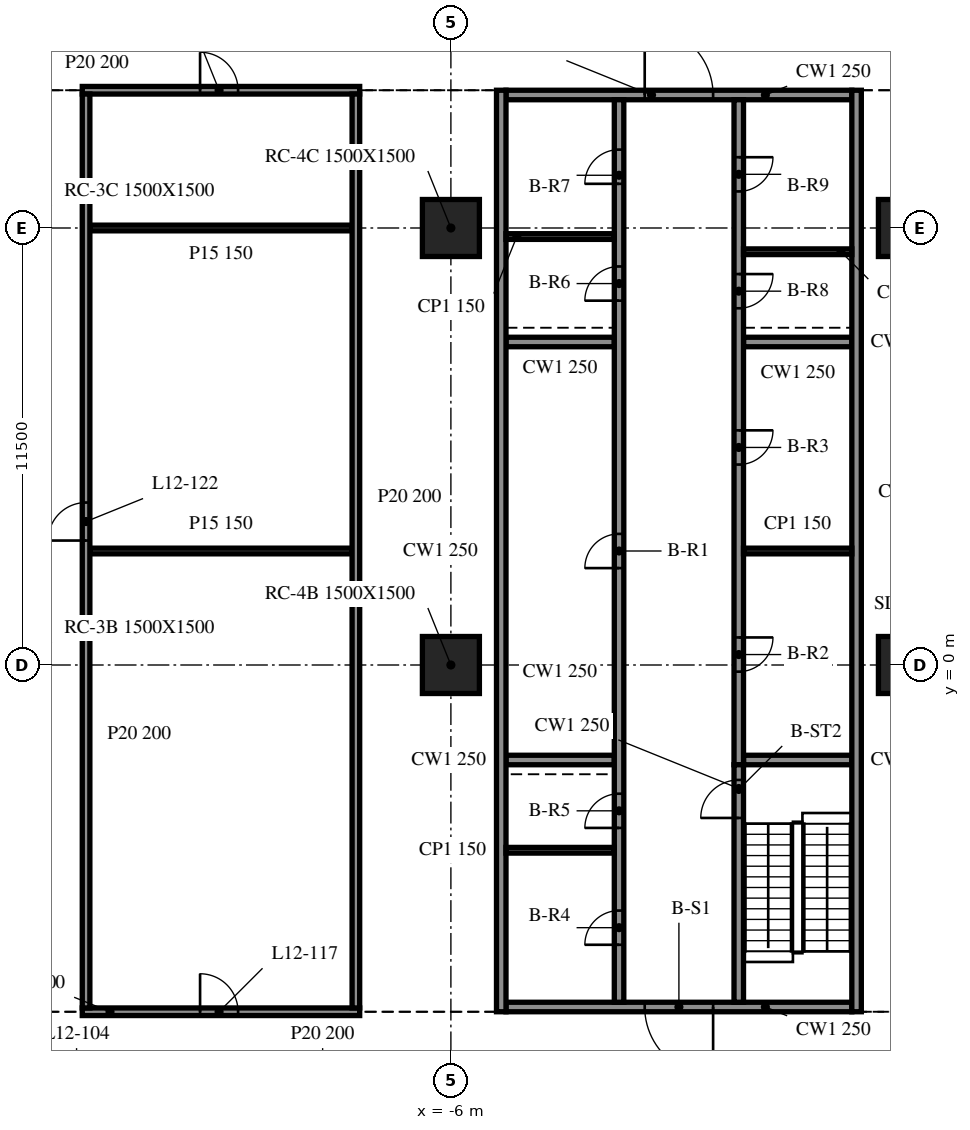
"""IFC4 building model, lengths in metres.
Left out: names, types, materials, properties, quantities, classifications, styles, units other than length and angle.
Written with IfcOpenShell. Run it as: python <this file> out.ifc"""

import sys

from ifc_helpers import new_model, si_unit, direction, frame, frame_2d, origin, origin_2d, place, context, subcontext, project, spatial, rectangle, extrude, element, fill, save


model = new_model("IFC4")
c1 = context("Model", 3, precision=1e-05, world=origin(), true_north=direction((0.0, 1.0)))
c2 = subcontext(c1, "Body", "Model", "MODEL_VIEW")
j1 = project(units=[si_unit("LENGTHUNIT", "METRE"), si_unit("PLANEANGLEUNIT", "RADIAN")], contexts=[c1])
p1 = place(None, origin())
s1 = spatial("IfcSite", under=j1, at=p1, CompositionType="ELEMENT")
p2 = place(p1, origin())
s2 = spatial("IfcBuilding", under=s1, at=p2, CompositionType="ELEMENT")
p3 = place(p2, frame((0.0, 0.0, 54.6)))
s3 = spatial("IfcBuildingStorey", under=s2, at=p3, CompositionType="ELEMENT", Elevation=54.6)
for number, where, z_axis, x_axis in (
    (1, (-6.0, 0.0, -0.34), (0.0, 0.0, 1.0), (1.0, 0.0, 0.0)),
    (2, (-6.0, 11.5, -0.34), (0.0, 0.0, 1.0), (1.0, 0.0, 0.0)),
    (3, (6.0, 0.0, -0.34), (0.0, 0.0, 1.0), (1.0, 0.0, 0.0)),
    (4, (6.0, 11.5, -0.34), (0.0, 0.0, 1.0), (1.0, 0.0, 0.0)),
):
    element("IfcColumn", number, at=place(p3, frame(where, z_axis=z_axis, x_axis=x_axis)), inside=s3, PredefinedType="COLUMN", context=c2, shape_type="SweptSolid", body=[
        extrude(rectangle(XDim=1.5, YDim=1.5, at=origin_2d()), origin(), (0.0, 0.0, 1.0), 4.3),
    ])
for number, where, z_axis, x_axis in (
    (5, (-4.675, 15.125, 0.0), (0.0, 0.0, 1.0), (0.0, -1.0, 0.0)),
    (6, (4.675, -9.125, 0.0), (0.0, 0.0, 1.0), (0.0, 1.0, 0.0)),
):
    element("IfcWall", number, at=place(p3, frame(where, z_axis=z_axis, x_axis=x_axis)), inside=s3, PredefinedType="SOLIDWALL", context=c2, shape_type="SweptSolid", body=[
        extrude(rectangle(XDim=24.25, YDim=0.25, at=frame_2d((12.125, 0.0))), origin(), (0.0, 0.0, 1.0), 3.96),
    ])
p4 = place(p3, frame((4.55, -9.0, 0.0), z_axis=(0.0, 0.0, 1.0), x_axis=(-1.0, 0.0, 0.0)))
e7 = element("IfcWall", 7, at=p4, inside=s3, PredefinedType="SOLIDWALL", context=c2, shape_type="SweptSolid", body=[
    extrude(rectangle(XDim=9.1, YDim=0.25, at=frame_2d((4.55, 0.0))), origin(), (0.0, 0.0, 1.0), 3.96),
])
p5 = place(p4, frame((3.65, 0.0, 0.0)))
e8 = element("IfcOpeningElement", 8, at=p5, cuts=e7, PredefinedType="OPENING", context=c2, shape_type="SweptSolid", body=[
    extrude(rectangle(XDim=1.8, YDim=2.1, at=frame_2d((0.9, 1.05))), frame((0.0, 0.135, 0.0), z_axis=(0.0, -1.0, 0.0), x_axis=(1.0, 0.0, 0.0)), (0.0, 0.0, 1.0), 0.27),
])
p6 = place(p3, frame((-4.55, 15.0, 0.0), z_axis=(0.0, 0.0, 1.0), x_axis=(1.0, 0.0, 0.0)))
e9 = element("IfcWall", 9, at=p6, inside=s3, PredefinedType="SOLIDWALL", context=c2, shape_type="SweptSolid", body=[
    extrude(rectangle(XDim=9.1, YDim=0.25, at=frame_2d((4.55, 0.0))), origin(), (0.0, 0.0, 1.0), 3.96),
])
p7 = place(p6, frame((3.65, 0.0, 0.0)))
e10 = element("IfcOpeningElement", 10, at=p7, cuts=e9, PredefinedType="OPENING", context=c2, shape_type="SweptSolid", body=[
    extrude(rectangle(XDim=1.8, YDim=2.1, at=frame_2d((0.9, 1.05))), frame((0.0, 0.135, 0.0), z_axis=(0.0, -1.0, 0.0), x_axis=(1.0, 0.0, 0.0)), (0.0, 0.0, 1.0), 0.27),
])
p8 = place(p3, frame((-1.575, -8.875, 0.0), z_axis=(0.0, 0.0, 1.0), x_axis=(0.0, 1.0, 0.0)))
e11 = element("IfcWall", 11, at=p8, inside=s3, PredefinedType="SOLIDWALL", context=c2, shape_type="SweptSolid", body=[
    extrude(rectangle(XDim=23.75, YDim=0.25, at=frame_2d((11.875, 0.0))), origin(), (0.0, 0.0, 1.0), 3.96),
])
p9 = place(p8, frame((11.425, 0.0, 0.0)))
e12 = element("IfcOpeningElement", 12, at=p9, cuts=e11, PredefinedType="OPENING", context=c2, shape_type="SweptSolid", body=[
    extrude(rectangle(XDim=0.9, YDim=2.1, at=frame_2d((0.45, 1.05))), frame((0.0, 0.135, 0.0), z_axis=(0.0, -1.0, 0.0), x_axis=(1.0, 0.0, 0.0)), (0.0, 0.0, 1.0), 0.27),
])
p10 = place(p8, frame((1.512, 0.0, 0.0)))
e13 = element("IfcOpeningElement", 13, at=p10, cuts=e11, PredefinedType="OPENING", context=c2, shape_type="SweptSolid", body=[
    extrude(rectangle(XDim=0.9, YDim=2.1, at=frame_2d((0.45, 1.05))), frame((0.0, 0.135, 0.0), z_axis=(0.0, -1.0, 0.0), x_axis=(1.0, 0.0, 0.0)), (0.0, 0.0, 1.0), 0.27),
])
p11 = place(p8, frame((4.587, 0.0, 0.0)))
e14 = element("IfcOpeningElement", 14, at=p11, cuts=e11, PredefinedType="OPENING", context=c2, shape_type="SweptSolid", body=[
    extrude(rectangle(XDim=0.9, YDim=2.1, at=frame_2d((0.45, 1.05))), frame((0.0, 0.135, 0.0), z_axis=(0.0, -1.0, 0.0), x_axis=(1.0, 0.0, 0.0)), (0.0, 0.0, 1.0), 0.27),
])
p12 = place(p8, frame((18.462, 0.0, 0.0)))
e15 = element("IfcOpeningElement", 15, at=p12, cuts=e11, PredefinedType="OPENING", context=c2, shape_type="SweptSolid", body=[
    extrude(rectangle(XDim=0.9, YDim=2.1, at=frame_2d((0.45, 1.05))), frame((0.0, 0.135, 0.0), z_axis=(0.0, -1.0, 0.0), x_axis=(1.0, 0.0, 0.0)), (0.0, 0.0, 1.0), 0.27),
])
p13 = place(p8, frame((21.538, 0.0, 0.0)))
e16 = element("IfcOpeningElement", 16, at=p13, cuts=e11, PredefinedType="OPENING", context=c2, shape_type="SweptSolid", body=[
    extrude(rectangle(XDim=0.9, YDim=2.1, at=frame_2d((0.45, 1.05))), frame((0.0, 0.135, 0.0), z_axis=(0.0, -1.0, 0.0), x_axis=(1.0, 0.0, 0.0)), (0.0, 0.0, 1.0), 0.27),
])
p14 = place(p3, frame((1.575, -8.875, 0.0), z_axis=(0.0, 0.0, 1.0), x_axis=(0.0, 1.0, 0.0)))
e17 = element("IfcWall", 17, at=p14, inside=s3, PredefinedType="SOLIDWALL", context=c2, shape_type="SweptSolid", body=[
    extrude(rectangle(XDim=6.25, YDim=0.25, at=frame_2d((3.125, 0.0))), origin(), (0.0, 0.0, 1.0), 3.96),
])
p15 = place(p14, frame((4.85, 0.0, 0.0)))
e18 = element("IfcOpeningElement", 18, at=p15, cuts=e17, PredefinedType="OPENING", context=c2, shape_type="SweptSolid", body=[
    extrude(rectangle(XDim=1.0, YDim=2.1, at=frame_2d((0.5, 1.05))), frame((0.0, 0.135, 0.0), z_axis=(0.0, -1.0, 0.0), x_axis=(1.0, 0.0, 0.0)), (0.0, 0.0, 1.0), 0.27),
])
p16 = place(p3, frame((1.575, 14.875, 0.0), z_axis=(0.0, 0.0, 1.0), x_axis=(0.0, -1.0, 0.0)))
e19 = element("IfcWall", 19, at=p16, inside=s3, PredefinedType="SOLIDWALL", context=c2, shape_type="SweptSolid", body=[
    extrude(rectangle(XDim=17.5, YDim=0.25, at=frame_2d((8.75, 0.0))), origin(), (0.0, 0.0, 1.0), 3.96),
])
p17 = place(p16, frame((14.15, 0.0, 0.0)))
e20 = element("IfcOpeningElement", 20, at=p17, cuts=e19, PredefinedType="OPENING", context=c2, shape_type="SweptSolid", body=[
    extrude(rectangle(XDim=0.9, YDim=2.1, at=frame_2d((0.45, 1.05))), frame((0.0, 0.135, 0.0), z_axis=(0.0, -1.0, 0.0), x_axis=(1.0, 0.0, 0.0)), (0.0, 0.0, 1.0), 0.27),
])
p18 = place(p16, frame((8.7, 0.0, 0.0)))
e21 = element("IfcOpeningElement", 21, at=p18, cuts=e19, PredefinedType="OPENING", context=c2, shape_type="SweptSolid", body=[
    extrude(rectangle(XDim=0.9, YDim=2.1, at=frame_2d((0.45, 1.05))), frame((0.0, 0.135, 0.0), z_axis=(0.0, -1.0, 0.0), x_axis=(1.0, 0.0, 0.0)), (0.0, 0.0, 1.0), 0.27),
])
p19 = place(p16, frame((4.587, 0.0, 0.0)))
e22 = element("IfcOpeningElement", 22, at=p19, cuts=e19, PredefinedType="OPENING", context=c2, shape_type="SweptSolid", body=[
    extrude(rectangle(XDim=0.9, YDim=2.1, at=frame_2d((0.45, 1.05))), frame((0.0, 0.135, 0.0), z_axis=(0.0, -1.0, 0.0), x_axis=(1.0, 0.0, 0.0)), (0.0, 0.0, 1.0), 0.27),
])
p20 = place(p16, frame((1.512, 0.0, 0.0)))
e23 = element("IfcOpeningElement", 23, at=p20, cuts=e19, PredefinedType="OPENING", context=c2, shape_type="SweptSolid", body=[
    extrude(rectangle(XDim=0.9, YDim=2.1, at=frame_2d((0.45, 1.05))), frame((0.0, 0.135, 0.0), z_axis=(0.0, -1.0, 0.0), x_axis=(1.0, 0.0, 0.0)), (0.0, 0.0, 1.0), 0.27),
])
for number, where, z_axis, x_axis in (
    (24, (-4.55, -2.5, 0.0), (0.0, 0.0, 1.0), (1.0, 0.0, 0.0)),
    (25, (-4.55, 8.5, 0.0), (0.0, 0.0, 1.0), (1.0, 0.0, 0.0)),
    (26, (1.7, -2.5, 0.0), (0.0, 0.0, 1.0), (1.0, 0.0, 0.0)),
    (27, (1.7, 8.5, 0.0), (0.0, 0.0, 1.0), (1.0, 0.0, 0.0)),
):
    element("IfcWall", number, at=place(p3, frame(where, z_axis=z_axis, x_axis=x_axis)), inside=s3, PredefinedType="SOLIDWALL", context=c2, shape_type="SweptSolid", body=[
        extrude(rectangle(XDim=2.85, YDim=0.25, at=frame_2d((1.425, 0.0))), origin(), (0.0, 0.0, 1.0), 3.96),
    ])
for number, where, z_axis, x_axis in (
    (28, (1.7, 3.0, 0.0), (0.0, 0.0, 1.0), (1.0, 0.0, 0.0)),
    (29, (-4.55, -4.875, 0.0), (0.0, 0.0, 1.0), (1.0, 0.0, 0.0)),
    (30, (-4.55, 11.275, 0.0), (0.0, 0.0, 1.0), (1.0, 0.0, 0.0)),
    (31, (1.7, 10.875, 0.0), (0.0, 0.0, 1.0), (1.0, 0.0, 0.0)),
):
    element("IfcWall", number, at=place(p3, frame(where, z_axis=z_axis, x_axis=x_axis)), inside=s3, PredefinedType="PARTITIONING", context=c2, shape_type="SweptSolid", body=[
        extrude(rectangle(XDim=2.85, YDim=0.15, at=frame_2d((1.425, 0.0))), origin(), (0.0, 0.0, 1.0), 3.96),
    ])
p21 = place(p3, frame((-15.7, -9.125, 0.0), z_axis=(0.0, 0.0, 1.0), x_axis=(1.0, 0.0, 0.0)))
e32 = element("IfcWall", 32, at=p21, inside=s3, PredefinedType="PARTITIONING", context=c2, shape_type="SweptSolid", body=[
    extrude(rectangle(XDim=7.3, YDim=0.2, at=frame_2d((3.65, 0.0))), origin(), (0.0, 0.0, 1.0), 3.96),
])
p22 = place(p21, frame((3.1, 0.0, 0.0)))
e33 = element("IfcOpeningElement", 33, at=p22, cuts=e32, PredefinedType="OPENING", context=c2, shape_type="SweptSolid", body=[
    extrude(rectangle(XDim=1.0, YDim=2.1, at=frame_2d((0.5, 1.05))), frame((0.0, 0.11, 0.0), z_axis=(0.0, -1.0, 0.0), x_axis=(1.0, 0.0, 0.0)), (0.0, 0.0, 1.0), 0.22),
])
for number, where, z_axis, x_axis in (
    (34, (-15.5, 3.0, 0.0), (0.0, 0.0, 1.0), (1.0, 0.0, 0.0)),
    (35, (-15.5, 11.5, 0.0), (0.0, 0.0, 1.0), (1.0, 0.0, 0.0)),
):
    element("IfcWall", number, at=place(p3, frame(where, z_axis=z_axis, x_axis=x_axis)), inside=s3, PredefinedType="PARTITIONING", context=c2, shape_type="SweptSolid", body=[
        extrude(rectangle(XDim=6.9, YDim=0.15, at=frame_2d((3.45, 0.0))), origin(), (0.0, 0.0, 1.0), 3.96),
    ])
p23 = place(p3, frame((-15.7, 15.125, 0.0), z_axis=(0.0, 0.0, 1.0), x_axis=(1.0, 0.0, 0.0)))
e36 = element("IfcWall", 36, at=p23, inside=s3, PredefinedType="PARTITIONING", context=c2, shape_type="SweptSolid", body=[
    extrude(rectangle(XDim=7.3, YDim=0.2, at=frame_2d((3.65, 0.0))), origin(), (0.0, 0.0, 1.0), 3.96),
])
p24 = place(p23, frame((3.1, 0.0, 0.0)))
e37 = element("IfcOpeningElement", 37, at=p24, cuts=e36, PredefinedType="OPENING", context=c2, shape_type="SweptSolid", body=[
    extrude(rectangle(XDim=1.0, YDim=2.1, at=frame_2d((0.5, 1.05))), frame((0.0, 0.11, 0.0), z_axis=(0.0, -1.0, 0.0), x_axis=(1.0, 0.0, 0.0)), (0.0, 0.0, 1.0), 0.22),
])
p25 = place(p3, frame((-15.6, -9.025, 0.0), z_axis=(0.0, 0.0, 1.0), x_axis=(0.0, 1.0, 0.0)))
e38 = element("IfcWall", 38, at=p25, inside=s3, PredefinedType="PARTITIONING", context=c2, shape_type="SweptSolid", body=[
    extrude(rectangle(XDim=24.05, YDim=0.2, at=frame_2d((12.025, 0.0))), origin(), (0.0, 0.0, 1.0), 3.96),
])
p26 = place(p25, frame((12.3, 0.0, 0.0)))
e39 = element("IfcOpeningElement", 39, at=p26, cuts=e38, PredefinedType="OPENING", context=c2, shape_type="SweptSolid", body=[
    extrude(rectangle(XDim=1.0, YDim=2.1, at=frame_2d((0.5, 1.05))), frame((0.0, 0.11, 0.0), z_axis=(0.0, -1.0, 0.0), x_axis=(1.0, 0.0, 0.0)), (0.0, 0.0, 1.0), 0.22),
])
p27 = place(p3, frame((-8.5, -9.025, 0.0), z_axis=(0.0, 0.0, 1.0), x_axis=(0.0, 1.0, 0.0)))
e40 = element("IfcWall", 40, at=p27, inside=s3, PredefinedType="PARTITIONING", context=c2, shape_type="SweptSolid", body=[
    extrude(rectangle(XDim=24.05, YDim=0.2, at=frame_2d((12.025, 0.0))), origin(), (0.0, 0.0, 1.0), 3.96),
])
p28 = place(p5, origin())
e41 = element("IfcDoor", 41, at=p28, inside=s3, OperationType="DOUBLE_DOOR_SINGLE_SWING", PredefinedType="DOOR", context=c2, shape_type="SweptSolid", body=[
    extrude(rectangle(XDim=1.8, YDim=2.1, at=frame_2d((0.9, 1.05))), frame((0.0, 0.025, 0.0), z_axis=(0.0, -1.0, 0.0), x_axis=(1.0, 0.0, 0.0)), (0.0, 0.0, 1.0), 0.05),
])
fill(e8, e41)
p29 = place(p7, origin())
e42 = element("IfcDoor", 42, at=p29, inside=s3, OperationType="DOUBLE_DOOR_SINGLE_SWING", PredefinedType="DOOR", context=c2, shape_type="SweptSolid", body=[
    extrude(rectangle(XDim=1.8, YDim=2.1, at=frame_2d((0.9, 1.05))), frame((0.0, 0.025, 0.0), z_axis=(0.0, -1.0, 0.0), x_axis=(1.0, 0.0, 0.0)), (0.0, 0.0, 1.0), 0.05),
])
fill(e10, e42)
p30 = place(p9, origin())
e43 = element("IfcDoor", 43, at=p30, inside=s3, OperationType="SINGLE_SWING_LEFT", PredefinedType="DOOR", context=c2, shape_type="SweptSolid", body=[
    extrude(rectangle(XDim=0.9, YDim=2.1, at=frame_2d((0.45, 1.05))), frame((0.0, 0.025, 0.0), z_axis=(0.0, -1.0, 0.0), x_axis=(1.0, 0.0, 0.0)), (0.0, 0.0, 1.0), 0.05),
])
fill(e12, e43)
p31 = place(p17, origin())
e44 = element("IfcDoor", 44, at=p31, inside=s3, OperationType="SINGLE_SWING_RIGHT", PredefinedType="DOOR", context=c2, shape_type="SweptSolid", body=[
    extrude(rectangle(XDim=0.9, YDim=2.1, at=frame_2d((0.45, 1.05))), frame((0.0, 0.025, 0.0), z_axis=(0.0, -1.0, 0.0), x_axis=(1.0, 0.0, 0.0)), (0.0, 0.0, 1.0), 0.05),
])
fill(e20, e44)
p32 = place(p18, origin())
e45 = element("IfcDoor", 45, at=p32, inside=s3, OperationType="SINGLE_SWING_LEFT", PredefinedType="DOOR", context=c2, shape_type="SweptSolid", body=[
    extrude(rectangle(XDim=0.9, YDim=2.1, at=frame_2d((0.45, 1.05))), frame((0.0, 0.025, 0.0), z_axis=(0.0, -1.0, 0.0), x_axis=(1.0, 0.0, 0.0)), (0.0, 0.0, 1.0), 0.05),
])
fill(e21, e45)
p33 = place(p10, origin())
e46 = element("IfcDoor", 46, at=p33, inside=s3, OperationType="SINGLE_SWING_RIGHT", PredefinedType="DOOR", context=c2, shape_type="SweptSolid", body=[
    extrude(rectangle(XDim=0.9, YDim=2.1, at=frame_2d((0.45, 1.05))), frame((0.0, 0.025, 0.0), z_axis=(0.0, -1.0, 0.0), x_axis=(1.0, 0.0, 0.0)), (0.0, 0.0, 1.0), 0.05),
])
fill(e13, e46)
p34 = place(p11, origin())
e47 = element("IfcDoor", 47, at=p34, inside=s3, OperationType="SINGLE_SWING_LEFT", PredefinedType="DOOR", context=c2, shape_type="SweptSolid", body=[
    extrude(rectangle(XDim=0.9, YDim=2.1, at=frame_2d((0.45, 1.05))), frame((0.0, 0.025, 0.0), z_axis=(0.0, -1.0, 0.0), x_axis=(1.0, 0.0, 0.0)), (0.0, 0.0, 1.0), 0.05),
])
fill(e14, e47)
p35 = place(p12, origin())
e48 = element("IfcDoor", 48, at=p35, inside=s3, OperationType="SINGLE_SWING_RIGHT", PredefinedType="DOOR", context=c2, shape_type="SweptSolid", body=[
    extrude(rectangle(XDim=0.9, YDim=2.1, at=frame_2d((0.45, 1.05))), frame((0.0, 0.025, 0.0), z_axis=(0.0, -1.0, 0.0), x_axis=(1.0, 0.0, 0.0)), (0.0, 0.0, 1.0), 0.05),
])
fill(e15, e48)
p36 = place(p13, origin())
e49 = element("IfcDoor", 49, at=p36, inside=s3, OperationType="SINGLE_SWING_LEFT", PredefinedType="DOOR", context=c2, shape_type="SweptSolid", body=[
    extrude(rectangle(XDim=0.9, YDim=2.1, at=frame_2d((0.45, 1.05))), frame((0.0, 0.025, 0.0), z_axis=(0.0, -1.0, 0.0), x_axis=(1.0, 0.0, 0.0)), (0.0, 0.0, 1.0), 0.05),
])
fill(e16, e49)
p37 = place(p19, origin())
e50 = element("IfcDoor", 50, at=p37, inside=s3, OperationType="SINGLE_SWING_RIGHT", PredefinedType="DOOR", context=c2, shape_type="SweptSolid", body=[
    extrude(rectangle(XDim=0.9, YDim=2.1, at=frame_2d((0.45, 1.05))), frame((0.0, 0.025, 0.0), z_axis=(0.0, -1.0, 0.0), x_axis=(1.0, 0.0, 0.0)), (0.0, 0.0, 1.0), 0.05),
])
fill(e22, e50)
p38 = place(p20, origin())
e51 = element("IfcDoor", 51, at=p38, inside=s3, OperationType="SINGLE_SWING_LEFT", PredefinedType="DOOR", context=c2, shape_type="SweptSolid", body=[
    extrude(rectangle(XDim=0.9, YDim=2.1, at=frame_2d((0.45, 1.05))), frame((0.0, 0.025, 0.0), z_axis=(0.0, -1.0, 0.0), x_axis=(1.0, 0.0, 0.0)), (0.0, 0.0, 1.0), 0.05),
])
fill(e23, e51)
p39 = place(p15, origin())
e52 = element("IfcDoor", 52, at=p39, inside=s3, OperationType="SINGLE_SWING_RIGHT", PredefinedType="DOOR", context=c2, shape_type="SweptSolid", body=[
    extrude(rectangle(XDim=1.0, YDim=2.1, at=frame_2d((0.5, 1.05))), frame((0.0, 0.025, 0.0), z_axis=(0.0, -1.0, 0.0), x_axis=(1.0, 0.0, 0.0)), (0.0, 0.0, 1.0), 0.05),
])
fill(e18, e52)
p40 = place(p22, origin())
e53 = element("IfcDoor", 53, at=p40, inside=s3, OperationType="SINGLE_SWING_LEFT", PredefinedType="DOOR", context=c2, shape_type="SweptSolid", body=[
    extrude(rectangle(XDim=1.0, YDim=2.1, at=frame_2d((0.5, 1.05))), frame((0.0, 0.025, 0.0), z_axis=(0.0, -1.0, 0.0), x_axis=(1.0, 0.0, 0.0)), (0.0, 0.0, 1.0), 0.05),
])
fill(e33, e53)
p41 = place(p26, origin())
e54 = element("IfcDoor", 54, at=p41, inside=s3, OperationType="SINGLE_SWING_LEFT", PredefinedType="DOOR", context=c2, shape_type="SweptSolid", body=[
    extrude(rectangle(XDim=1.0, YDim=2.1, at=frame_2d((0.5, 1.05))), frame((0.0, 0.025, 0.0), z_axis=(0.0, -1.0, 0.0), x_axis=(1.0, 0.0, 0.0)), (0.0, 0.0, 1.0), 0.05),
])
fill(e39, e54)
p42 = place(p24, origin())
e55 = element("IfcDoor", 55, at=p42, inside=s3, OperationType="SINGLE_SWING_RIGHT", PredefinedType="DOOR", context=c2, shape_type="SweptSolid", body=[
    extrude(rectangle(XDim=1.0, YDim=2.1, at=frame_2d((0.5, 1.05))), frame((0.0, 0.025, 0.0), z_axis=(0.0, -1.0, 0.0), x_axis=(1.0, 0.0, 0.0)), (0.0, 0.0, 1.0), 0.05),
])
fill(e37, e55)
save(model, sys.argv[1])
